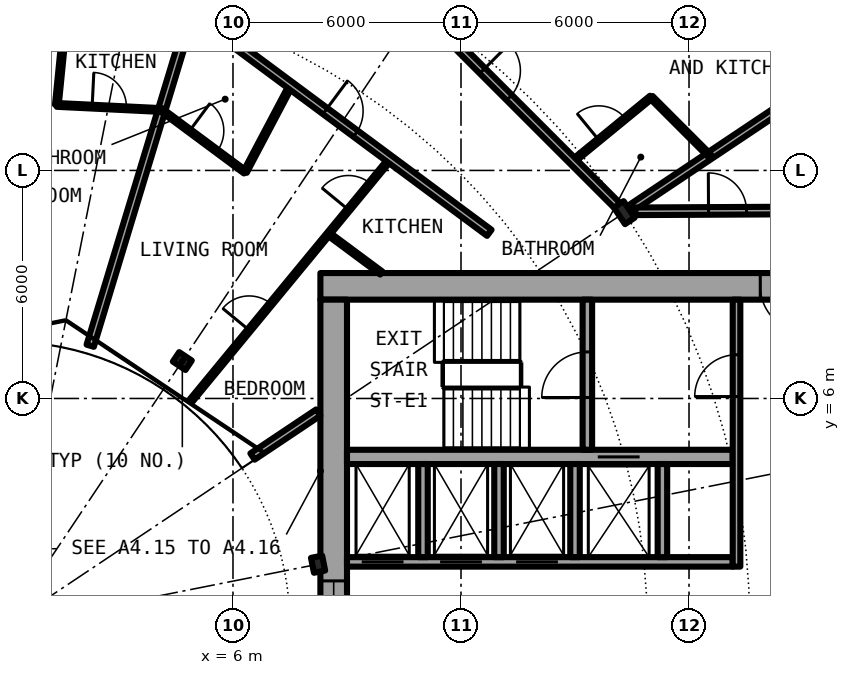
"""IFC4 building model, lengths in metres.
Left out: names, types, materials, properties, quantities, classifications, styles, units other than length and angle.
Written with IfcOpenShell. Run it as: python <this file> out.ifc"""

import sys

from ifc_helpers import new_model, si_unit, direction, frame, frame_2d, origin, origin_2d, place, context, subcontext, project, spatial, rectangle, i_section, extrude, element, fill, save


model = new_model("IFC4")
c1 = context("Model", 3, precision=1e-05, world=origin(), true_north=direction((0.0, 1.0)))
c2 = subcontext(c1, "Body", "Model", "MODEL_VIEW")
j1 = project(units=[si_unit("LENGTHUNIT", "METRE"), si_unit("PLANEANGLEUNIT", "RADIAN")], contexts=[c1])
p1 = place(None, origin())
s1 = spatial("IfcSite", under=j1, at=p1, CompositionType="ELEMENT")
p2 = place(p1, origin())
s2 = spatial("IfcBuilding", under=s1, at=p2, CompositionType="ELEMENT")
p3 = place(p2, frame((0.0, 0.0, 91.05)))
s3 = spatial("IfcBuildingStorey", under=s2, at=p3, CompositionType="ELEMENT", Elevation=91.05)
p4 = place(p3, frame((16.297, 10.889, 0.0), z_axis=(0.0, 0.0, 1.0), x_axis=(0.831469612303, 0.55557023302, 0.0)))
e1 = element("IfcColumn", 1, at=p4, inside=s3, PredefinedType="COLUMN", context=c2, shape_type="SweptSolid", body=[
    extrude(i_section(OverallWidth=0.306, OverallDepth=0.524, WebThickness=0.021, FlangeThickness=0.04, FilletRadius=0.027, at=origin_2d()), origin(), (0.0, 0.0, 1.0), 3.05),
])
for number, where, z_axis, x_axis in (
    (2, (8.239, 1.639, 0.0), (0.0, 0.0, 1.0), (0.981, 0.195, 0.0)),
    (3, (4.667, 6.984, 0.0), (0.0, 0.0, 1.0), (0.556, 0.831, 0.0)),
):
    element("IfcColumn", number, at=place(p3, frame(where, z_axis=z_axis, x_axis=x_axis)), inside=s3, PredefinedType="COLUMN", context=c2, shape_type="SweptSolid", body=[
        extrude(i_section(OverallWidth=0.3, OverallDepth=0.4, WebThickness=0.013, FlangeThickness=0.024, FilletRadius=0.027, at=origin_2d()), origin(), (0.0, 0.0, 1.0), 3.05),
    ])
p5 = place(p3, frame((22.699, 15.167, 0.0), z_axis=(0.0, 0.0, 1.0), x_axis=(-0.634382322723, 0.773019449054, 0.0)))
e4 = element("IfcWall", 4, at=p5, inside=s3, PredefinedType="SOLIDWALL", context=c2, shape_type="SweptSolid", body=[
    extrude(rectangle(XDim=5.352, YDim=0.25, at=frame_2d((2.676, 0.0))), origin(), (0.0, 0.0, 1.0), 2.7),
])
p6 = place(p5, frame((0.441, 0.0, 0.3)))
e5 = element("IfcOpeningElement", 5, at=p6, cuts=e4, PredefinedType="OPENING", context=c2, shape_type="SweptSolid", body=[
    extrude(rectangle(XDim=1.8, YDim=2.1, at=frame_2d((0.9, 1.05))), frame((0.0, 0.135, 0.0), z_axis=(0.0, -1.0, 0.0), x_axis=(1.0, 0.0, 0.0)), (0.0, 0.0, 1.0), 0.27),
])
p7 = place(p5, frame((3.51, 0.0, 0.0)))
e6 = element("IfcOpeningElement", 6, at=p7, cuts=e4, PredefinedType="OPENING", context=c2, shape_type="SweptSolid", body=[
    extrude(rectangle(XDim=1.0, YDim=2.2, at=frame_2d((0.5, 1.1))), frame((0.0, 0.135, 0.0), z_axis=(0.0, -1.0, 0.0), x_axis=(1.0, 0.0, 0.0)), (0.0, 0.0, 1.0), 0.27),
])
p8 = place(p3, frame((22.3, 8.95, 0.0), z_axis=(0.0, 0.0, 1.0), x_axis=(-1.0, 0.0, 0.0)))
e7 = element("IfcWall", 7, at=p8, inside=s3, PredefinedType="SHEAR", context=c2, shape_type="SweptSolid", body=[
    extrude(rectangle(XDim=14.0, YDim=0.7, at=frame_2d((7.0, 0.0))), origin(), (0.0, 0.0, 1.0), 3.05),
])
p9 = place(p8, frame((1.225, 0.0, 0.0)))
e8 = element("IfcOpeningElement", 8, at=p9, cuts=e7, PredefinedType="OPENING", context=c2, shape_type="SweptSolid", body=[
    extrude(rectangle(XDim=1.2, YDim=2.3, at=frame_2d((0.6, 1.15))), frame((0.0, 0.36, 0.0), z_axis=(0.0, -1.0, 0.0), x_axis=(1.0, 0.0, 0.0)), (0.0, 0.0, 1.0), 0.72),
])
p10 = place(p3, frame((8.65, -8.6, 0.0), z_axis=(0.0, 0.0, 1.0), x_axis=(0.0, 1.0, 0.0)))
e9 = element("IfcWall", 9, at=p10, inside=s3, PredefinedType="SHEAR", context=c2, shape_type="SweptSolid", body=[
    extrude(rectangle(XDim=17.2, YDim=0.7, at=frame_2d((8.6, 0.0))), origin(), (0.0, 0.0, 1.0), 3.05),
])
p11 = place(p10, frame((7.4, 0.0, 0.1)))
e10 = element("IfcOpeningElement", 10, at=p11, cuts=e9, PredefinedType="OPENING", context=c2, shape_type="SweptSolid", body=[
    extrude(rectangle(XDim=2.4, YDim=2.2, at=frame_2d((1.2, 1.1))), frame((0.0, 0.36, 0.0), z_axis=(0.0, -1.0, 0.0), x_axis=(1.0, 0.0, 0.0)), (0.0, 0.0, 1.0), 0.72),
])
p12 = place(p3, frame((9.0, 1.7, 0.0), z_axis=(0.0, 0.0, 1.0), x_axis=(1.0, 0.0, 0.0)))
e11 = element("IfcWall", 11, at=p12, inside=s3, PredefinedType="SHEAR", context=c2, shape_type="SweptSolid", body=[
    extrude(rectangle(XDim=10.15, YDim=0.25, at=frame_2d((5.075, 0.0))), origin(), (0.0, 0.0, 1.0), 3.05),
])
p13 = place(p12, frame((0.387, 0.0, 0.0)))
e12 = element("IfcOpeningElement", 12, at=p13, cuts=e11, PredefinedType="OPENING", context=c2, shape_type="SweptSolid", body=[
    extrude(rectangle(XDim=1.1, YDim=2.3, at=frame_2d((0.55, 1.15))), frame((0.0, 0.135, 0.0), z_axis=(0.0, -1.0, 0.0), x_axis=(1.0, 0.0, 0.0)), (0.0, 0.0, 1.0), 0.27),
])
p14 = place(p12, frame((2.45, 0.0, 0.0)))
e13 = element("IfcOpeningElement", 13, at=p14, cuts=e11, PredefinedType="OPENING", context=c2, shape_type="SweptSolid", body=[
    extrude(rectangle(XDim=1.1, YDim=2.3, at=frame_2d((0.55, 1.15))), frame((0.0, 0.135, 0.0), z_axis=(0.0, -1.0, 0.0), x_axis=(1.0, 0.0, 0.0)), (0.0, 0.0, 1.0), 0.27),
])
p15 = place(p12, frame((4.45, 0.0, 0.0)))
e14 = element("IfcOpeningElement", 14, at=p15, cuts=e11, PredefinedType="OPENING", context=c2, shape_type="SweptSolid", body=[
    extrude(rectangle(XDim=1.1, YDim=2.3, at=frame_2d((0.55, 1.15))), frame((0.0, 0.135, 0.0), z_axis=(0.0, -1.0, 0.0), x_axis=(1.0, 0.0, 0.0)), (0.0, 0.0, 1.0), 0.27),
])
p16 = place(p3, frame((9.0, 4.462, 0.0), z_axis=(0.0, 0.0, 1.0), x_axis=(1.0, 0.0, 0.0)))
e15 = element("IfcWall", 15, at=p16, inside=s3, PredefinedType="SHEAR", context=c2, shape_type="SweptSolid", body=[
    extrude(rectangle(XDim=10.15, YDim=0.375, at=frame_2d((5.075, 0.0))), origin(), (0.0, 0.0, 1.0), 3.05),
])
p17 = place(p16, frame((6.6, 0.0, 0.0)))
e16 = element("IfcOpeningElement", 16, at=p17, cuts=e15, PredefinedType="OPENING", context=c2, shape_type="SweptSolid", body=[
    extrude(rectangle(XDim=1.1, YDim=2.3, at=frame_2d((0.55, 1.15))), frame((0.0, 0.198, 0.0), z_axis=(0.0, -1.0, 0.0), x_axis=(1.0, 0.0, 0.0)), (0.0, 0.0, 1.0), 0.395),
])
p18 = place(p3, frame((15.325, 4.65, 0.0), z_axis=(0.0, 0.0, 1.0), x_axis=(0.0, 1.0, 0.0)))
e17 = element("IfcWall", 17, at=p18, inside=s3, PredefinedType="SHEAR", context=c2, shape_type="SweptSolid", body=[
    extrude(rectangle(XDim=3.95, YDim=0.25, at=frame_2d((1.975, 0.0))), origin(), (0.0, 0.0, 1.0), 3.05),
])
p19 = place(p18, frame((1.375, 0.0, 0.0)))
e18 = element("IfcOpeningElement", 18, at=p19, cuts=e17, PredefinedType="OPENING", context=c2, shape_type="SweptSolid", body=[
    extrude(rectangle(XDim=1.2, YDim=2.3, at=frame_2d((0.6, 1.15))), frame((0.0, 0.135, 0.0), z_axis=(0.0, -1.0, 0.0), x_axis=(1.0, 0.0, 0.0)), (0.0, 0.0, 1.0), 0.27),
])
for number, where, z_axis, x_axis in (
    (19, (15.0, 1.825, 0.0), (0.0, 0.0, 1.0), (0.0, 1.0, 0.0)),
    (20, (17.3, 1.825, 0.0), (0.0, 0.0, 1.0), (0.0, 1.0, 0.0)),
):
    element("IfcWall", number, at=place(p3, frame(where, z_axis=z_axis, x_axis=x_axis)), inside=s3, PredefinedType="SOLIDWALL", context=c2, shape_type="SweptSolid", body=[
        extrude(rectangle(XDim=2.45, YDim=0.25, at=frame_2d((1.225, 0.0))), origin(), (0.0, 0.0, 1.0), 2.7),
    ])
p20 = place(p3, frame((19.25, 1.575, 0.0), z_axis=(0.0, 0.0, 1.0), x_axis=(0.0, 1.0, 0.0)))
e21 = element("IfcWall", 21, at=p20, inside=s3, PredefinedType="SOLIDWALL", context=c2, shape_type="SweptSolid", body=[
    extrude(rectangle(XDim=7.025, YDim=0.2, at=frame_2d((3.513, 0.0))), origin(), (0.0, 0.0, 1.0), 2.7),
])
p21 = place(p20, frame((4.475, 0.0, 0.0)))
e22 = element("IfcOpeningElement", 22, at=p21, cuts=e21, PredefinedType="OPENING", context=c2, shape_type="SweptSolid", body=[
    extrude(rectangle(XDim=1.1, YDim=2.3, at=frame_2d((0.55, 1.15))), frame((0.0, 0.11, 0.0), z_axis=(0.0, -1.0, 0.0), x_axis=(1.0, 0.0, 0.0)), (0.0, 0.0, 1.0), 0.22),
])
for number, where, z_axis, x_axis in (
    (23, (11.0, 1.825, 0.0), (0.0, 0.0, 1.0), (0.0, 1.0, 0.0)),
    (24, (13.0, 1.825, 0.0), (0.0, 0.0, 1.0), (0.0, 1.0, 0.0)),
):
    element("IfcWall", number, at=place(p3, frame(where, z_axis=z_axis, x_axis=x_axis)), inside=s3, PredefinedType="SOLIDWALL", context=c2, shape_type="SweptSolid", body=[
        extrude(rectangle(XDim=2.45, YDim=0.25, at=frame_2d((1.225, 0.0))), origin(), (0.0, 0.0, 1.0), 2.7),
    ])
p22 = place(p3, frame((1.365, 13.724, 0.0), z_axis=(0.0, 0.0, 1.0), x_axis=(0.099171803948, 0.995070325807, 0.0)))
e25 = element("IfcWall", 25, at=p22, inside=s3, PredefinedType="PARTITIONING", context=c2, shape_type="SweptSolid", body=[
    extrude(rectangle(XDim=2.622, YDim=0.1, at=frame_2d((1.311, 0.0))), origin(), (0.0, 0.0, 1.0), 2.7),
])
p23 = place(p3, frame((2.243, 7.387, 0.0), z_axis=(0.0, 0.0, 1.0), x_axis=(0.290196345171, 0.956967126525, 0.0)))
e26 = element("IfcWall", 26, at=p23, inside=s3, PredefinedType="PARTITIONING", context=c2, shape_type="SweptSolid", body=[
    extrude(rectangle(XDim=9.18, YDim=0.2, at=frame_2d((4.59, 0.0))), origin(), (0.0, 0.0, 1.0), 2.7),
])
p24 = place(p3, frame((4.909, 5.958, 0.0), z_axis=(0.0, 0.0, 1.0), x_axis=(0.635976043025, 0.771708800454, 0.0)))
e27 = element("IfcWall", 27, at=p24, inside=s3, PredefinedType="PARTITIONING", context=c2, shape_type="SweptSolid", body=[
    extrude(rectangle(XDim=8.213, YDim=0.1, at=frame_2d((4.106, 0.0))), origin(), (0.0, 0.0, 1.0), 2.7),
])
p25 = place(p24, frame((6.49, 0.0, 0.0)))
e28 = element("IfcOpeningElement", 28, at=p25, cuts=e27, PredefinedType="OPENING", context=c2, shape_type="SweptSolid", body=[
    extrude(rectangle(XDim=0.9, YDim=2.3, at=frame_2d((0.45, 1.15))), frame((0.0, 0.06, 0.0), z_axis=(0.0, -1.0, 0.0), x_axis=(1.0, 0.0, 0.0)), (0.0, 0.0, 1.0), 0.12),
])
p26 = place(p24, frame((2.384, 0.0, 0.0)))
e29 = element("IfcOpeningElement", 29, at=p26, cuts=e27, PredefinedType="OPENING", context=c2, shape_type="SweptSolid", body=[
    extrude(rectangle(XDim=0.9, YDim=2.3, at=frame_2d((0.45, 1.15))), frame((0.0, 0.06, 0.0), z_axis=(0.0, -1.0, 0.0), x_axis=(1.0, 0.0, 0.0)), (0.0, 0.0, 1.0), 0.12),
])
p27 = place(p3, frame((6.318, 11.96, 0.0), z_axis=(0.0, 0.0, 1.0), x_axis=(0.467001992543, 0.884256263173, 0.0)))
e30 = element("IfcWall", 30, at=p27, inside=s3, PredefinedType="PARTITIONING", context=c2, shape_type="SweptSolid", body=[
    extrude(rectangle(XDim=2.572, YDim=0.1, at=frame_2d((1.286, 0.0))), origin(), (0.0, 0.0, 1.0), 2.7),
])
p28 = place(p3, frame((14.945, 12.241, 0.0), z_axis=(0.0, 0.0, 1.0), x_axis=(0.77367517848, 0.633582447834, 0.0)))
e31 = element("IfcWall", 31, at=p28, inside=s3, PredefinedType="PARTITIONING", context=c2, shape_type="SweptSolid", body=[
    extrude(rectangle(XDim=2.661, YDim=0.1, at=frame_2d((1.331, 0.0))), origin(), (0.0, 0.0, 1.0), 2.7),
])
p29 = place(p28, frame((0.881, 0.0, 0.0)))
e32 = element("IfcOpeningElement", 32, at=p29, cuts=e31, PredefinedType="OPENING", context=c2, shape_type="SweptSolid", body=[
    extrude(rectangle(XDim=0.9, YDim=2.3, at=frame_2d((0.45, 1.15))), frame((0.0, 0.06, 0.0), z_axis=(0.0, -1.0, 0.0), x_axis=(1.0, 0.0, 0.0)), (0.0, 0.0, 1.0), 0.12),
])
p30 = place(p3, frame((16.515, 11.034, 0.0), z_axis=(0.0, 0.0, 1.0), x_axis=(0.831382022135, 0.555701298605, 0.0)))
e33 = element("IfcWall", 33, at=p30, inside=s3, PredefinedType="PARTITIONING", context=c2, shape_type="SweptSolid", body=[
    extrude(rectangle(XDim=7.313, YDim=0.2, at=frame_2d((3.657, 0.0))), origin(), (0.0, 0.0, 1.0), 2.7),
])
p31 = place(p3, frame((6.513, 4.472, 0.0), z_axis=(0.0, 0.0, 1.0), x_axis=(0.831382204863, 0.555701025225, 0.0)))
e34 = element("IfcWall", 34, at=p31, inside=s3, PredefinedType="PARTITIONING", context=c2, shape_type="SweptSolid", body=[
    extrude(rectangle(XDim=2.082, YDim=0.2, at=frame_2d((1.041, 0.0))), origin(), (0.0, 0.0, 1.0), 2.7),
])
p32 = place(p3, frame((16.588, 10.925, 0.0), z_axis=(0.0, 0.0, 1.0), x_axis=(0.999988019025, 0.004895079807, 0.0)))
e35 = element("IfcWall", 35, at=p32, inside=s3, PredefinedType="PARTITIONING", context=c2, shape_type="SweptSolid", body=[
    extrude(rectangle(XDim=5.087, YDim=0.2, at=frame_2d((2.543, 0.0))), origin(), (0.0, 0.0, 1.0), 2.7),
])
p33 = place(p32, frame((1.925, 0.0, 0.0)))
e36 = element("IfcOpeningElement", 36, at=p33, cuts=e35, PredefinedType="OPENING", context=c2, shape_type="SweptSolid", body=[
    extrude(rectangle(XDim=1.0, YDim=2.3, at=frame_2d((0.5, 1.15))), frame((0.0, 0.11, 0.0), z_axis=(0.0, -1.0, 0.0), x_axis=(1.0, 0.0, 0.0)), (0.0, 0.0, 1.0), 0.22),
])
p34 = place(p3, frame((4.122, 13.589, 0.0), z_axis=(0.0, 0.0, 1.0), x_axis=(0.803128348509, -0.595806055542, 0.0)))
e37 = element("IfcWall", 37, at=p34, inside=s3, PredefinedType="PARTITIONING", context=c2, shape_type="SweptSolid", body=[
    extrude(rectangle(XDim=2.734, YDim=0.1, at=frame_2d((1.367, 0.0))), origin(), (0.0, 0.0, 1.0), 2.7),
])
p35 = place(p34, frame((0.917, 0.0, 0.0)))
e38 = element("IfcOpeningElement", 38, at=p35, cuts=e37, PredefinedType="OPENING", context=c2, shape_type="SweptSolid", body=[
    extrude(rectangle(XDim=0.9, YDim=2.3, at=frame_2d((0.45, 1.15))), frame((0.0, 0.06, 0.0), z_axis=(0.0, -1.0, 0.0), x_axis=(1.0, 0.0, 0.0)), (0.0, 0.0, 1.0), 0.12),
])
p36 = place(p3, frame((8.512, 10.332, 0.0), z_axis=(0.0, 0.0, 1.0), x_axis=(0.803135014325, -0.595797070121, 0.0)))
e39 = element("IfcWall", 39, at=p36, inside=s3, PredefinedType="PARTITIONING", context=c2, shape_type="SweptSolid", body=[
    extrude(rectangle(XDim=1.732, YDim=0.1, at=frame_2d((0.866, 0.0))), origin(), (0.0, 0.0, 1.0), 2.7),
])
p37 = place(p3, frame((1.365, 13.724, 0.0), z_axis=(0.0, 0.0, 1.0), x_axis=(0.99880320044, -0.048909782152, 0.0)))
e40 = element("IfcWall", 40, at=p37, inside=s3, PredefinedType="PARTITIONING", context=c2, shape_type="SweptSolid", body=[
    extrude(rectangle(XDim=2.76, YDim=0.1, at=frame_2d((1.38, 0.0))), origin(), (0.0, 0.0, 1.0), 2.7),
])
p38 = place(p37, frame((0.93, 0.0, 0.0)))
e41 = element("IfcOpeningElement", 41, at=p38, cuts=e40, PredefinedType="OPENING", context=c2, shape_type="SweptSolid", body=[
    extrude(rectangle(XDim=0.9, YDim=2.3, at=frame_2d((0.45, 1.15))), frame((0.0, 0.06, 0.0), z_axis=(0.0, -1.0, 0.0), x_axis=(1.0, 0.0, 0.0)), (0.0, 0.0, 1.0), 0.12),
])
p39 = place(p3, frame((4.906, 16.172, 0.0), z_axis=(0.0, 0.0, 1.0), x_axis=(0.803191461888, -0.595720971219, 0.0)))
e42 = element("IfcWall", 42, at=p39, inside=s3, PredefinedType="PARTITIONING", context=c2, shape_type="SweptSolid", body=[
    extrude(rectangle(XDim=9.76, YDim=0.2, at=frame_2d((4.88, 0.0))), origin(), (0.0, 0.0, 1.0), 2.7),
])
p40 = place(p39, frame((4.38, 0.0, 0.0)))
e43 = element("IfcOpeningElement", 43, at=p40, cuts=e42, PredefinedType="OPENING", context=c2, shape_type="SweptSolid", body=[
    extrude(rectangle(XDim=1.0, YDim=2.3, at=frame_2d((0.5, 1.15))), frame((0.0, 0.11, 0.0), z_axis=(0.0, -1.0, 0.0), x_axis=(1.0, 0.0, 0.0)), (0.0, 0.0, 1.0), 0.22),
])
p41 = place(p3, frame((11.0, 16.186, 0.0), z_axis=(0.0, 0.0, 1.0), x_axis=(0.707106781187, -0.707106781187, 0.0)))
e44 = element("IfcWall", 44, at=p41, inside=s3, PredefinedType="PARTITIONING", context=c2, shape_type="SweptSolid", body=[
    extrude(rectangle(XDim=7.334, YDim=0.2, at=frame_2d((3.667, 0.0))), origin(), (0.0, 0.0, 1.0), 2.38),
])
p42 = place(p41, frame((2.211, 0.0, 0.0)))
e45 = element("IfcOpeningElement", 45, at=p42, cuts=e44, PredefinedType="OPENING", context=c2, shape_type="SweptSolid", body=[
    extrude(rectangle(XDim=1.0, YDim=2.3, at=frame_2d((0.5, 1.15))), frame((0.0, 0.11, 0.0), z_axis=(0.0, -1.0, 0.0), x_axis=(1.0, 0.0, 0.0)), (0.0, 0.0, 1.0), 0.22),
])
p43 = place(p3, frame((17.006, 13.924, 0.0), z_axis=(0.0, 0.0, 1.0), x_axis=(0.706826194425, -0.707387256653, 0.0)))
e46 = element("IfcWall", 46, at=p43, inside=s3, PredefinedType="PARTITIONING", context=c2, shape_type="SweptSolid", body=[
    extrude(rectangle(XDim=2.176, YDim=0.1, at=frame_2d((1.088, 0.0))), origin(), (0.0, 0.0, 1.0), 2.7),
])
p44 = place(p13, origin())
e47 = element("IfcDoor", 47, at=p44, inside=s3, OperationType="DOUBLE_DOOR_SLIDING", PredefinedType="DOOR", context=c2, shape_type="SweptSolid", body=[
    extrude(rectangle(XDim=1.1, YDim=2.3, at=frame_2d((0.55, 1.15))), frame((0.0, 0.025, 0.0), z_axis=(0.0, -1.0, 0.0), x_axis=(1.0, 0.0, 0.0)), (0.0, 0.0, 1.0), 0.05),
])
fill(e12, e47)
p45 = place(p14, origin())
e48 = element("IfcDoor", 48, at=p45, inside=s3, OperationType="DOUBLE_DOOR_SLIDING", PredefinedType="DOOR", context=c2, shape_type="SweptSolid", body=[
    extrude(rectangle(XDim=1.1, YDim=2.3, at=frame_2d((0.55, 1.15))), frame((0.0, 0.025, 0.0), z_axis=(0.0, -1.0, 0.0), x_axis=(1.0, 0.0, 0.0)), (0.0, 0.0, 1.0), 0.05),
])
fill(e13, e48)
p46 = place(p15, origin())
e49 = element("IfcDoor", 49, at=p46, inside=s3, OperationType="DOUBLE_DOOR_SLIDING", PredefinedType="DOOR", context=c2, shape_type="SweptSolid", body=[
    extrude(rectangle(XDim=1.1, YDim=2.3, at=frame_2d((0.55, 1.15))), frame((0.0, 0.025, 0.0), z_axis=(0.0, -1.0, 0.0), x_axis=(1.0, 0.0, 0.0)), (0.0, 0.0, 1.0), 0.05),
])
fill(e14, e49)
p47 = place(p17, origin())
e50 = element("IfcDoor", 50, at=p47, inside=s3, OperationType="DOUBLE_DOOR_SLIDING", PredefinedType="DOOR", context=c2, shape_type="SweptSolid", body=[
    extrude(rectangle(XDim=1.1, YDim=2.3, at=frame_2d((0.55, 1.15))), frame((0.0, 0.025, 0.0), z_axis=(0.0, -1.0, 0.0), x_axis=(1.0, 0.0, 0.0)), (0.0, 0.0, 1.0), 0.05),
])
fill(e16, e50)
p48 = place(p19, origin())
e51 = element("IfcDoor", 51, at=p48, inside=s3, OperationType="SINGLE_SWING_LEFT", PredefinedType="DOOR", context=c2, shape_type="SweptSolid", body=[
    extrude(rectangle(XDim=1.2, YDim=2.3, at=frame_2d((0.6, 1.15))), frame((0.0, 0.025, 0.0), z_axis=(0.0, -1.0, 0.0), x_axis=(1.0, 0.0, 0.0)), (0.0, 0.0, 1.0), 0.05),
])
fill(e18, e51)
p49 = place(p21, origin())
e52 = element("IfcDoor", 52, at=p49, inside=s3, OperationType="SINGLE_SWING_LEFT", PredefinedType="DOOR", context=c2, shape_type="SweptSolid", body=[
    extrude(rectangle(XDim=1.1, YDim=2.3, at=frame_2d((0.55, 1.15))), frame((0.0, 0.025, 0.0), z_axis=(0.0, -1.0, 0.0), x_axis=(1.0, 0.0, 0.0)), (0.0, 0.0, 1.0), 0.05),
])
fill(e22, e52)
p50 = place(p9, origin())
e53 = element("IfcDoor", 53, at=p50, inside=s3, OperationType="SINGLE_SWING_RIGHT", PredefinedType="DOOR", context=c2, shape_type="SweptSolid", body=[
    extrude(rectangle(XDim=1.2, YDim=2.3, at=frame_2d((0.6, 1.15))), frame((0.0, 0.025, 0.0), z_axis=(0.0, -1.0, 0.0), x_axis=(1.0, 0.0, 0.0)), (0.0, 0.0, 1.0), 0.05),
])
fill(e8, e53)
p51 = place(p11, origin())
e54 = element("IfcWindow", 54, at=p51, inside=s3, PartitioningType="SINGLE_PANEL", PredefinedType="WINDOW", context=c2, shape_type="SweptSolid", body=[
    extrude(rectangle(XDim=2.4, YDim=2.2, at=frame_2d((1.2, 1.1))), frame((0.0, 0.03, 0.0), z_axis=(0.0, -1.0, 0.0), x_axis=(1.0, 0.0, 0.0)), (0.0, 0.0, 1.0), 0.06),
])
fill(e10, e54)
p52 = place(p42, origin())
e55 = element("IfcDoor", 55, at=p52, inside=s3, OperationType="SINGLE_SWING_LEFT", PredefinedType="DOOR", context=c2, shape_type="SweptSolid", body=[
    extrude(rectangle(XDim=1.0, YDim=2.3, at=frame_2d((0.5, 1.15))), frame((0.0, 0.025, 0.0), z_axis=(0.0, -1.0, 0.0), x_axis=(1.0, 0.0, 0.0)), (0.0, 0.0, 1.0), 0.05),
])
fill(e45, e55)
p53 = place(p29, origin())
e56 = element("IfcDoor", 56, at=p53, inside=s3, OperationType="SINGLE_SWING_LEFT", PredefinedType="DOOR", context=c2, shape_type="SweptSolid", body=[
    extrude(rectangle(XDim=0.9, YDim=2.3, at=frame_2d((0.45, 1.15))), frame((0.0, 0.025, 0.0), z_axis=(0.0, -1.0, 0.0), x_axis=(1.0, 0.0, 0.0)), (0.0, 0.0, 1.0), 0.05),
])
fill(e32, e56)
p54 = place(p40, origin())
e57 = element("IfcDoor", 57, at=p54, inside=s3, OperationType="SINGLE_SWING_LEFT", PredefinedType="DOOR", context=c2, shape_type="SweptSolid", body=[
    extrude(rectangle(XDim=1.0, YDim=2.3, at=frame_2d((0.5, 1.15))), frame((0.0, 0.025, 0.0), z_axis=(0.0, -1.0, 0.0), x_axis=(1.0, 0.0, 0.0)), (0.0, 0.0, 1.0), 0.05),
])
fill(e43, e57)
p55 = place(p35, origin())
e58 = element("IfcDoor", 58, at=p55, inside=s3, OperationType="SINGLE_SWING_LEFT", PredefinedType="DOOR", context=c2, shape_type="SweptSolid", body=[
    extrude(rectangle(XDim=0.9, YDim=2.3, at=frame_2d((0.45, 1.15))), frame((0.0, 0.025, 0.0), z_axis=(0.0, -1.0, 0.0), x_axis=(1.0, 0.0, 0.0)), (0.0, 0.0, 1.0), 0.05),
])
fill(e38, e58)
p56 = place(p25, origin())
e59 = element("IfcDoor", 59, at=p56, inside=s3, OperationType="SINGLE_SWING_RIGHT", PredefinedType="DOOR", context=c2, shape_type="SweptSolid", body=[
    extrude(rectangle(XDim=0.9, YDim=2.3, at=frame_2d((0.45, 1.15))), frame((0.0, 0.025, 0.0), z_axis=(0.0, -1.0, 0.0), x_axis=(1.0, 0.0, 0.0)), (0.0, 0.0, 1.0), 0.05),
])
fill(e28, e59)
p57 = place(p26, origin())
e60 = element("IfcDoor", 60, at=p57, inside=s3, OperationType="SINGLE_SWING_LEFT", PredefinedType="DOOR", context=c2, shape_type="SweptSolid", body=[
    extrude(rectangle(XDim=0.9, YDim=2.3, at=frame_2d((0.45, 1.15))), frame((0.0, 0.025, 0.0), z_axis=(0.0, -1.0, 0.0), x_axis=(1.0, 0.0, 0.0)), (0.0, 0.0, 1.0), 0.05),
])
fill(e29, e60)
p58 = place(p38, origin())
e61 = element("IfcDoor", 61, at=p58, inside=s3, OperationType="SINGLE_SWING_RIGHT", PredefinedType="DOOR", context=c2, shape_type="SweptSolid", body=[
    extrude(rectangle(XDim=0.9, YDim=2.3, at=frame_2d((0.45, 1.15))), frame((0.0, 0.025, 0.0), z_axis=(0.0, -1.0, 0.0), x_axis=(1.0, 0.0, 0.0)), (0.0, 0.0, 1.0), 0.05),
])
fill(e41, e61)
p59 = place(p33, origin())
e62 = element("IfcDoor", 62, at=p59, inside=s3, OperationType="SINGLE_SWING_LEFT", PredefinedType="DOOR", context=c2, shape_type="SweptSolid", body=[
    extrude(rectangle(XDim=1.0, YDim=2.3, at=frame_2d((0.5, 1.15))), frame((0.0, 0.025, 0.0), z_axis=(0.0, -1.0, 0.0), x_axis=(1.0, 0.0, 0.0)), (0.0, 0.0, 1.0), 0.05),
])
fill(e36, e62)
save(model, sys.argv[1])
